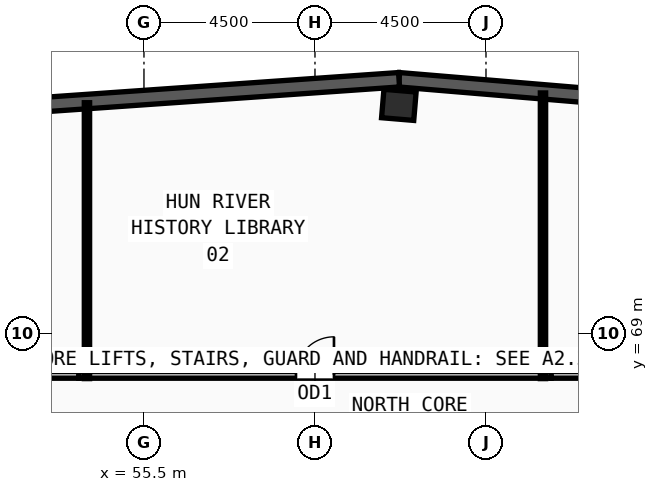
"""IFC4 building model, lengths in metres.
Left out: names, types, materials, properties, quantities, classifications, styles, units other than length and angle.
Written with IfcOpenShell. Run it as: python <this file> out.ifc"""

import sys

from ifc_helpers import new_model, si_unit, direction, frame, frame_2d, origin, origin_2d, place, context, subcontext, project, spatial, rectangle, extrude, source, transform, mapped, element, fill, save


model = new_model("IFC4")
c1 = context("Model", 3, precision=1e-05, world=origin(), true_north=direction((0.0, 1.0)))
c2 = subcontext(c1, "Body", "Model", "MODEL_VIEW")
j1 = project(units=[si_unit("LENGTHUNIT", "METRE"), si_unit("PLANEANGLEUNIT", "RADIAN")], contexts=[c1])
p1 = place(None, origin())
s1 = spatial("IfcSite", under=j1, at=p1, CompositionType="ELEMENT")
p2 = place(p1, origin())
s2 = spatial("IfcBuilding", under=s1, at=p2, CompositionType="ELEMENT")
p3 = place(p2, frame((0.0, 0.0, 355.8)))
s3 = spatial("IfcBuildingStorey", under=s2, at=p3, CompositionType="ELEMENT", Elevation=355.8)
m1 = source(origin(), c2, "Body", "SweptSolid", [
    extrude(rectangle(XDim=0.85, YDim=0.75, at=origin_2d()), origin(), (0.0, 0.0, 1.0), 4.8),
])
p4 = place(p3, frame((62.207, 75.013, 0.0), z_axis=(0.0, 0.0, 1.0), x_axis=(-0.996507448611, 0.083503921245, 0.0)))
e1 = element("IfcColumn", 1, at=p4, inside=s3, PredefinedType="COLUMN", context=c2, shape_type="MappedRepresentation", body=[
    mapped(m1, transform((0.0, 0.0, 0.0), x_axis=(1.0, 0.0, 0.0), y_axis=(0.0, 1.0, 0.0), z_axis=(0.0, 0.0, 1.0), scale=1.0)),
])
p5 = place(p3, frame((84.44, 73.814, 0.0), z_axis=(0.0, 0.0, 1.0), x_axis=(-0.996516863227, 0.0833914942, 0.0)))
e2 = element("IfcWall", 2, at=p5, inside=s3, PredefinedType="SOLIDWALL", context=c2, shape_type="SweptSolid", body=[
    extrude(rectangle(XDim=22.306, YDim=0.38, at=frame_2d((11.153, 0.0))), origin(), (0.0, 0.0, 1.0), 4.35),
])
m2 = source(origin(), c2, "Body", "SweptSolid", [
    extrude(rectangle(XDim=1.35, YDim=1.85, at=frame_2d((0.675, 0.925))), frame((0.0, 0.2, 0.0), z_axis=(0.0, -1.0, 0.0), x_axis=(1.0, 0.0, 0.0)), (0.0, 0.0, 1.0), 0.4),
])
p6 = place(p5, frame((10.478, 0.0, 0.55)))
e3 = element("IfcOpeningElement", 3, at=p6, cuts=e2, PredefinedType="OPENING", context=c2, shape_type="MappedRepresentation", body=[
    mapped(m2, transform((0.0, 0.0, 0.0), x_axis=(1.0, 0.0, 0.0), y_axis=(0.0, 1.0, 0.0), z_axis=(0.0, 0.0, 1.0), scale=1.0)),
])
p7 = place(p3, frame((62.212, 75.674, 0.0), z_axis=(0.0, 0.0, 1.0), x_axis=(-0.997568264598, -0.069696179709, 0.0)))
e4 = element("IfcWall", 4, at=p7, inside=s3, PredefinedType="SOLIDWALL", context=c2, shape_type="SweptSolid", body=[
    extrude(rectangle(XDim=26.717, YDim=0.38, at=frame_2d((13.358, 0.0))), origin(), (0.0, 0.0, 1.0), 4.35),
])
p8 = place(p7, frame((12.683, 0.0, 0.55)))
e5 = element("IfcOpeningElement", 5, at=p8, cuts=e4, PredefinedType="OPENING", context=c2, shape_type="MappedRepresentation", body=[
    mapped(m2, transform((0.0, 0.0, 0.0), x_axis=(1.0, 0.0, 0.0), y_axis=(0.0, 1.0, 0.0), z_axis=(0.0, 0.0, 1.0), scale=1.0)),
])
p9 = place(p3, frame((53.785, 67.91, 0.0), z_axis=(0.0, 0.0, 1.0), x_axis=(1.0, 0.0, 0.0)))
e6 = element("IfcWall", 6, at=p9, inside=s3, PredefinedType="PARTITIONING", context=c2, shape_type="SweptSolid", body=[
    extrude(rectangle(XDim=12.43, YDim=0.18, at=frame_2d((6.215, 0.0))), origin(), (0.0, 0.0, 1.0), 4.35),
])
m3 = source(origin(), c2, "Body", "SweptSolid", [
    extrude(rectangle(XDim=1.0, YDim=2.2, at=frame_2d((0.5, 1.1))), frame((0.0, 0.1, 0.0), z_axis=(0.0, -1.0, 0.0), x_axis=(1.0, 0.0, 0.0)), (0.0, 0.0, 1.0), 0.2),
])
p10 = place(p9, frame((5.715, 0.0, 0.0)))
e7 = element("IfcOpeningElement", 7, at=p10, cuts=e6, PredefinedType="OPENING", context=c2, shape_type="MappedRepresentation", body=[
    mapped(m3, transform((0.0, 0.0, 0.0), x_axis=(1.0, 0.0, 0.0), y_axis=(0.0, 1.0, 0.0), z_axis=(0.0, 0.0, 1.0), scale=1.0)),
])
for number, where, z_axis, x_axis in (
    (8, (66.215, 67.91, 0.0), (0.0, 0.0, 1.0), (1.0, 0.0, 0.0)),
    (9, (44.37, 67.91, 0.0), (0.0, 0.0, 1.0), (1.0, 0.0, 0.0)),
):
    element("IfcWall", number, at=place(p3, frame(where, z_axis=z_axis, x_axis=x_axis)), inside=s3, PredefinedType="PARTITIONING", context=c2, shape_type="SweptSolid", body=[
        extrude(rectangle(XDim=9.415, YDim=0.18, at=frame_2d((4.708, 0.0))), origin(), (0.0, 0.0, 1.0), 4.35),
    ])
p11 = place(p3, frame((54.0, 67.81, 0.0), z_axis=(0.0, 0.0, 1.0), x_axis=(0.0, 1.0, 0.0)))
e10 = element("IfcWall", 10, at=p11, inside=s3, PredefinedType="PARTITIONING", context=c2, shape_type="SweptSolid", body=[
    extrude(rectangle(XDim=7.26, YDim=0.14, at=frame_2d((3.63, 0.0))), origin(), (0.0, 0.0, 1.0), 4.35),
])
p12 = place(p3, frame((66.0, 67.81, 0.0), z_axis=(0.0, 0.0, 1.0), x_axis=(0.0, 1.0, 0.0)))
e11 = element("IfcWall", 11, at=p12, inside=s3, PredefinedType="PARTITIONING", context=c2, shape_type="SweptSolid", body=[
    extrude(rectangle(XDim=7.517, YDim=0.14, at=frame_2d((3.758, 0.0))), origin(), (0.0, 0.0, 1.0), 4.35),
])
m4 = source(origin(), c2, "Body", "SweptSolid", [
    extrude(rectangle(XDim=1.0, YDim=2.2, at=frame_2d((0.5, 1.1))), frame((0.0, 0.025, 0.0), z_axis=(0.0, -1.0, 0.0), x_axis=(1.0, 0.0, 0.0)), (0.0, 0.0, 1.0), 0.05),
])
p13 = place(p10, origin())
e12 = element("IfcDoor", 12, at=p13, inside=s3, OperationType="SINGLE_SWING_RIGHT", PredefinedType="DOOR", context=c2, shape_type="MappedRepresentation", body=[
    mapped(m4, transform((0.0, 0.0, 0.0), x_axis=(1.0, 0.0, 0.0), y_axis=(0.0, 1.0, 0.0), z_axis=(0.0, 0.0, 1.0), scale=1.0)),
])
fill(e7, e12)
save(model, sys.argv[1])
